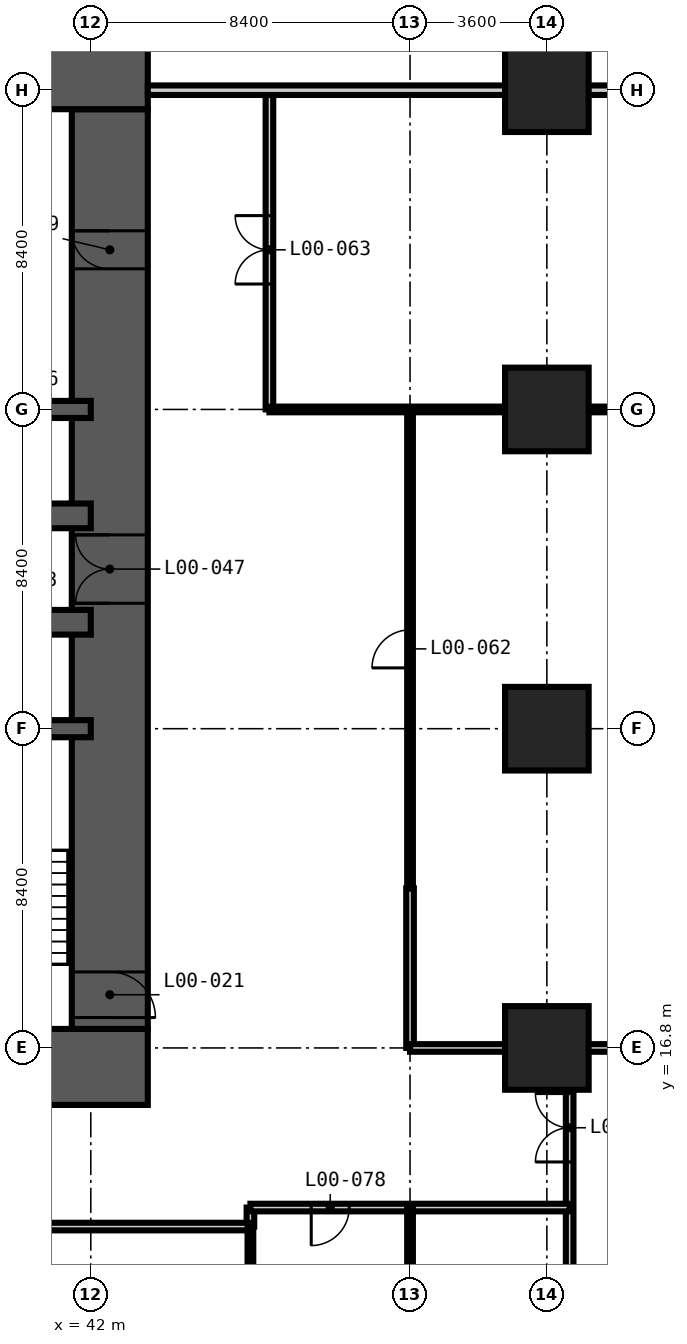
"""IFC4 building model, lengths in metres.
Left out: names, types, materials, properties, quantities, classifications, styles, units other than length and angle.
Written with IfcOpenShell. Run it as: python <this file> out.ifc"""

import sys

from ifc_helpers import new_model, si_unit, direction, frame, frame_2d, origin, origin_2d, place, context, subcontext, project, spatial, rectangle, extrude, element, fill, save


model = new_model("IFC4")
c1 = context("Model", 3, precision=1e-05, world=origin(), true_north=direction((0.0, 1.0)))
c2 = subcontext(c1, "Body", "Model", "MODEL_VIEW")
j1 = project(units=[si_unit("LENGTHUNIT", "METRE"), si_unit("PLANEANGLEUNIT", "RADIAN")], contexts=[c1])
p1 = place(None, origin())
s1 = spatial("IfcSite", under=j1, at=p1, CompositionType="ELEMENT")
p2 = place(p1, origin())
s2 = spatial("IfcBuilding", under=s1, at=p2, CompositionType="ELEMENT")
p3 = place(p2, origin())
s3 = spatial("IfcBuildingStorey", under=s2, at=p3, CompositionType="ELEMENT", Elevation=0.0)
for number, where, z_axis, x_axis in (
    (1, (54.0, 16.8, -0.3), (0.0, 0.0, 1.0), (1.0, 0.0, 0.0)),
    (2, (54.0, 25.2, -0.3), (0.0, 0.0, 1.0), (1.0, 0.0, 0.0)),
    (3, (54.0, 33.6, -0.3), (0.0, 0.0, 1.0), (1.0, 0.0, 0.0)),
    (4, (54.0, 42.0, -0.3), (0.0, 0.0, 1.0), (1.0, 0.0, 0.0)),
):
    element("IfcColumn", number, at=place(p3, frame(where, z_axis=z_axis, x_axis=x_axis)), inside=s3, PredefinedType="COLUMN", context=c2, shape_type="SweptSolid", body=[
        extrude(rectangle(XDim=2.2, YDim=2.2, at=origin_2d()), origin(), (0.0, 0.0, 1.0), 6.0),
    ])
p4 = place(p3, frame((15.3, 16.3, -0.3), z_axis=(0.0, 0.0, 1.0), x_axis=(1.0, 0.0, 0.0)))
e5 = element("IfcWall", 5, at=p4, inside=s3, PredefinedType="SHEAR", context=c2, shape_type="SweptSolid", body=[
    extrude(rectangle(XDim=28.2, YDim=2.0, at=frame_2d((14.1, 0.0))), origin(), (0.0, 0.0, 1.0), 6.0),
])
p5 = place(p4, frame((13.6, 0.0, 0.3)))
e6 = element("IfcOpeningElement", 6, at=p5, cuts=e5, PredefinedType="OPENING", context=c2, shape_type="SweptSolid", body=[
    extrude(rectangle(XDim=1.0, YDim=2.1, at=frame_2d((0.5, 1.05))), frame((0.0, 1.01, 0.0), z_axis=(0.0, -1.0, 0.0), x_axis=(1.0, 0.0, 0.0)), (0.0, 0.0, 1.0), 2.02),
])
p6 = place(p4, frame((19.9, 0.0, 0.3)))
e7 = element("IfcOpeningElement", 7, at=p6, cuts=e5, PredefinedType="OPENING", context=c2, shape_type="SweptSolid", body=[
    extrude(rectangle(XDim=1.0, YDim=2.1, at=frame_2d((0.5, 1.05))), frame((0.0, 1.01, 0.0), z_axis=(0.0, -1.0, 0.0), x_axis=(1.0, 0.0, 0.0)), (0.0, 0.0, 1.0), 2.02),
])
p7 = place(p3, frame((42.5, 17.3, -0.3), z_axis=(0.0, 0.0, 1.0), x_axis=(0.0, 1.0, 0.0)))
e8 = element("IfcWall", 8, at=p7, inside=s3, PredefinedType="SHEAR", context=c2, shape_type="SweptSolid", body=[
    extrude(rectangle(XDim=24.2, YDim=2.0, at=frame_2d((12.1, 0.0))), origin(), (0.0, 0.0, 1.0), 6.0),
])
p8 = place(p7, frame((0.3, 0.0, 0.3)))
e9 = element("IfcOpeningElement", 9, at=p8, cuts=e8, PredefinedType="OPENING", context=c2, shape_type="SweptSolid", body=[
    extrude(rectangle(XDim=1.2, YDim=2.2, at=frame_2d((0.6, 1.1))), frame((0.0, 1.01, 0.0), z_axis=(0.0, -1.0, 0.0), x_axis=(1.0, 0.0, 0.0)), (0.0, 0.0, 1.0), 2.02),
])
p9 = place(p7, frame((11.2, 0.0, 0.3)))
e10 = element("IfcOpeningElement", 10, at=p9, cuts=e8, PredefinedType="OPENING", context=c2, shape_type="SweptSolid", body=[
    extrude(rectangle(XDim=1.8, YDim=2.2, at=frame_2d((0.9, 1.1))), frame((0.0, 1.01, 0.0), z_axis=(0.0, -1.0, 0.0), x_axis=(1.0, 0.0, 0.0)), (0.0, 0.0, 1.0), 2.02),
])
p10 = place(p7, frame((20.0, 0.0, 0.3)))
e11 = element("IfcOpeningElement", 11, at=p10, cuts=e8, PredefinedType="OPENING", context=c2, shape_type="SweptSolid", body=[
    extrude(rectangle(XDim=1.0, YDim=2.1, at=frame_2d((0.5, 1.05))), frame((0.0, 1.01, 0.0), z_axis=(0.0, -1.0, 0.0), x_axis=(1.0, 0.0, 0.0)), (0.0, 0.0, 1.0), 2.02),
])
p11 = place(p3, frame((43.5, 42.5, -0.3), z_axis=(0.0, 0.0, 1.0), x_axis=(-1.0, 0.0, 0.0)))
e12 = element("IfcWall", 12, at=p11, inside=s3, PredefinedType="SHEAR", context=c2, shape_type="SweptSolid", body=[
    extrude(rectangle(XDim=28.2, YDim=2.0, at=frame_2d((14.1, 0.0))), origin(), (0.0, 0.0, 1.0), 6.0),
])
p12 = place(p11, frame((22.0, 0.0, 0.3)))
e13 = element("IfcOpeningElement", 13, at=p12, cuts=e12, PredefinedType="OPENING", context=c2, shape_type="SweptSolid", body=[
    extrude(rectangle(XDim=1.0, YDim=2.1, at=frame_2d((0.5, 1.05))), frame((0.0, 1.01, 0.0), z_axis=(0.0, -1.0, 0.0), x_axis=(1.0, 0.0, 0.0)), (0.0, 0.0, 1.0), 2.02),
])
p13 = place(p11, frame((11.4, 0.0, 0.3)))
e14 = element("IfcOpeningElement", 14, at=p13, cuts=e12, PredefinedType="OPENING", context=c2, shape_type="SweptSolid", body=[
    extrude(rectangle(XDim=1.2, YDim=2.2, at=frame_2d((0.6, 1.1))), frame((0.0, 1.01, 0.0), z_axis=(0.0, -1.0, 0.0), x_axis=(1.0, 0.0, 0.0)), (0.0, 0.0, 1.0), 2.02),
])
p14 = place(p3, frame((16.8, 25.2, -0.3), z_axis=(0.0, 0.0, 1.0), x_axis=(1.0, 0.0, 0.0)))
e15 = element("IfcWall", 15, at=p14, inside=s3, PredefinedType="SHEAR", context=c2, shape_type="SweptSolid", body=[
    extrude(rectangle(XDim=25.2, YDim=0.45, at=frame_2d((12.6, 0.0))), origin(), (0.0, 0.0, 1.0), 6.0),
])
p15 = place(p3, frame((16.8, 33.6, -0.3), z_axis=(0.0, 0.0, 1.0), x_axis=(1.0, 0.0, 0.0)))
e16 = element("IfcWall", 16, at=p15, inside=s3, PredefinedType="SHEAR", context=c2, shape_type="SweptSolid", body=[
    extrude(rectangle(XDim=25.2, YDim=0.45, at=frame_2d((12.6, 0.0))), origin(), (0.0, 0.0, 1.0), 6.0),
])
p16 = place(p15, frame((14.2, 0.0, 0.3)))
e17 = element("IfcOpeningElement", 17, at=p16, cuts=e16, PredefinedType="OPENING", context=c2, shape_type="SweptSolid", body=[
    extrude(rectangle(XDim=1.0, YDim=2.1, at=frame_2d((0.5, 1.05))), frame((0.0, 0.235, 0.0), z_axis=(0.0, -1.0, 0.0), x_axis=(1.0, 0.0, 0.0)), (0.0, 0.0, 1.0), 0.47),
])
p17 = place(p15, frame((22.6, 0.0, 0.3)))
e18 = element("IfcOpeningElement", 18, at=p17, cuts=e16, PredefinedType="OPENING", context=c2, shape_type="SweptSolid", body=[
    extrude(rectangle(XDim=1.0, YDim=2.1, at=frame_2d((0.5, 1.05))), frame((0.0, 0.235, 0.0), z_axis=(0.0, -1.0, 0.0), x_axis=(1.0, 0.0, 0.0)), (0.0, 0.0, 1.0), 0.47),
])
p18 = place(p3, frame((33.6, 28.0, -0.3), z_axis=(0.0, 0.0, 1.0), x_axis=(1.0, 0.0, 0.0)))
e19 = element("IfcWall", 19, at=p18, inside=s3, PredefinedType="SHEAR", context=c2, shape_type="SweptSolid", body=[
    extrude(rectangle(XDim=8.4, YDim=0.65, at=frame_2d((4.2, 0.0))), origin(), (0.0, 0.0, 1.0), 6.0),
])
p19 = place(p18, frame((1.55, 0.0, 0.3)))
e20 = element("IfcOpeningElement", 20, at=p19, cuts=e19, PredefinedType="OPENING", context=c2, shape_type="SweptSolid", body=[
    extrude(rectangle(XDim=1.1, YDim=2.2, at=frame_2d((0.55, 1.1))), frame((0.0, 0.335, 0.0), z_axis=(0.0, -1.0, 0.0), x_axis=(1.0, 0.0, 0.0)), (0.0, 0.0, 1.0), 0.67),
])
p20 = place(p18, frame((5.75, 0.0, 0.3)))
e21 = element("IfcOpeningElement", 21, at=p20, cuts=e19, PredefinedType="OPENING", context=c2, shape_type="SweptSolid", body=[
    extrude(rectangle(XDim=1.1, YDim=2.2, at=frame_2d((0.55, 1.1))), frame((0.0, 0.335, 0.0), z_axis=(0.0, -1.0, 0.0), x_axis=(1.0, 0.0, 0.0)), (0.0, 0.0, 1.0), 0.67),
])
p21 = place(p3, frame((33.6, 30.8, -0.3), z_axis=(0.0, 0.0, 1.0), x_axis=(1.0, 0.0, 0.0)))
e22 = element("IfcWall", 22, at=p21, inside=s3, PredefinedType="SHEAR", context=c2, shape_type="SweptSolid", body=[
    extrude(rectangle(XDim=8.4, YDim=0.65, at=frame_2d((4.2, 0.0))), origin(), (0.0, 0.0, 1.0), 6.0),
])
p22 = place(p3, frame((46.2, 12.1, 0.0), z_axis=(0.0, 0.0, 1.0), x_axis=(0.0, 1.0, 0.0)))
e23 = element("IfcWall", 23, at=p22, inside=s3, PredefinedType="PARTITIONING", context=c2, shape_type="SweptSolid", body=[
    extrude(rectangle(XDim=0.5, YDim=0.2, at=frame_2d((0.25, 0.0))), origin(), (0.0, 0.0, 1.0), 5.7),
])
p23 = place(p3, frame((46.7, 33.6, 0.0), z_axis=(0.0, 0.0, 1.0), x_axis=(0.0, 1.0, 0.0)))
e24 = element("IfcWall", 24, at=p23, inside=s3, PredefinedType="PARTITIONING", context=c2, shape_type="SweptSolid", body=[
    extrude(rectangle(XDim=8.4, YDim=0.2, at=frame_2d((4.2, 0.0))), origin(), (0.0, 0.0, 1.0), 5.7),
])
p24 = place(p23, frame((3.3, 0.0, 0.0)))
e25 = element("IfcOpeningElement", 25, at=p24, cuts=e24, PredefinedType="OPENING", context=c2, shape_type="SweptSolid", body=[
    extrude(rectangle(XDim=1.8, YDim=2.4, at=frame_2d((0.9, 1.2))), frame((0.0, 0.11, 0.0), z_axis=(0.0, -1.0, 0.0), x_axis=(1.0, 0.0, 0.0)), (0.0, 0.0, 1.0), 0.22),
])
p25 = place(p3, frame((50.4, 16.8, 0.0), z_axis=(0.0, 0.0, 1.0), x_axis=(0.0, 1.0, 0.0)))
e26 = element("IfcWall", 26, at=p25, inside=s3, PredefinedType="PARTITIONING", context=c2, shape_type="SweptSolid", body=[
    extrude(rectangle(XDim=4.2, YDim=0.2, at=frame_2d((2.1, 0.0))), origin(), (0.0, 0.0, 1.0), 5.7),
])
p26 = place(p3, frame((54.6, 0.0, 0.0), z_axis=(0.0, 0.0, 1.0), x_axis=(0.0, 1.0, 0.0)))
e27 = element("IfcWall", 27, at=p26, inside=s3, PredefinedType="PARTITIONING", context=c2, shape_type="SweptSolid", body=[
    extrude(rectangle(XDim=16.8, YDim=0.2, at=frame_2d((8.4, 0.0))), origin(), (0.0, 0.0, 1.0), 5.7),
])
p27 = place(p26, frame((13.8, 0.0, 0.0)))
e28 = element("IfcOpeningElement", 28, at=p27, cuts=e27, PredefinedType="OPENING", context=c2, shape_type="SweptSolid", body=[
    extrude(rectangle(XDim=1.8, YDim=2.4, at=frame_2d((0.9, 1.2))), frame((0.0, 0.11, 0.0), z_axis=(0.0, -1.0, 0.0), x_axis=(1.0, 0.0, 0.0)), (0.0, 0.0, 1.0), 0.22),
])
p28 = place(p26, frame((5.4, 0.0, 0.0)))
e29 = element("IfcOpeningElement", 29, at=p28, cuts=e27, PredefinedType="OPENING", context=c2, shape_type="SweptSolid", body=[
    extrude(rectangle(XDim=1.8, YDim=2.4, at=frame_2d((0.9, 1.2))), frame((0.0, 0.11, 0.0), z_axis=(0.0, -1.0, 0.0), x_axis=(1.0, 0.0, 0.0)), (0.0, 0.0, 1.0), 0.22),
])
p29 = place(p3, frame((12.6, 12.1, 0.0), z_axis=(0.0, 0.0, 1.0), x_axis=(1.0, 0.0, 0.0)))
e30 = element("IfcWall", 30, at=p29, inside=s3, PredefinedType="PARTITIONING", context=c2, shape_type="SweptSolid", body=[
    extrude(rectangle(XDim=33.6, YDim=0.2, at=frame_2d((16.8, 0.0))), origin(), (0.0, 0.0, 1.0), 5.7),
])
p30 = place(p3, frame((46.2, 12.6, 0.0), z_axis=(0.0, 0.0, 1.0), x_axis=(1.0, 0.0, 0.0)))
e31 = element("IfcWall", 31, at=p30, inside=s3, PredefinedType="PARTITIONING", context=c2, shape_type="SweptSolid", body=[
    extrude(rectangle(XDim=8.4, YDim=0.2, at=frame_2d((4.2, 0.0))), origin(), (0.0, 0.0, 1.0), 5.7),
])
p31 = place(p30, frame((1.6, 0.0, 0.0)))
e32 = element("IfcOpeningElement", 32, at=p31, cuts=e31, PredefinedType="OPENING", context=c2, shape_type="SweptSolid", body=[
    extrude(rectangle(XDim=1.0, YDim=2.1, at=frame_2d((0.5, 1.05))), frame((0.0, 0.11, 0.0), z_axis=(0.0, -1.0, 0.0), x_axis=(1.0, 0.0, 0.0)), (0.0, 0.0, 1.0), 0.22),
])
p32 = place(p3, frame((50.4, 16.8, 0.0), z_axis=(0.0, 0.0, 1.0), x_axis=(1.0, 0.0, 0.0)))
e33 = element("IfcWall", 33, at=p32, inside=s3, PredefinedType="PARTITIONING", context=c2, shape_type="SweptSolid", body=[
    extrude(rectangle(XDim=8.4, YDim=0.2, at=frame_2d((4.2, 0.0))), origin(), (0.0, 0.0, 1.0), 5.7),
])
p33 = place(p3, frame((43.5, 42.0, 0.0), z_axis=(0.0, 0.0, 1.0), x_axis=(1.0, 0.0, 0.0)))
e34 = element("IfcWall", 34, at=p33, inside=s3, PredefinedType="PARTITIONING", context=c2, shape_type="SweptSolid", body=[
    extrude(rectangle(XDim=15.3, YDim=0.25, at=frame_2d((7.65, 0.0))), origin(), (0.0, 0.0, 1.0), 5.7),
])
p34 = place(p3, frame((46.2, 2.4, 0.0), z_axis=(0.0, 0.0, 1.0), x_axis=(0.0, 1.0, 0.0)))
e35 = element("IfcWall", 35, at=p34, inside=s3, PredefinedType="PARTITIONING", context=c2, shape_type="SweptSolid", body=[
    extrude(rectangle(XDim=9.7, YDim=0.15, at=frame_2d((4.85, 0.0))), origin(), (0.0, 0.0, 1.0), 5.7),
])
p35 = place(p3, frame((50.4, 2.4, 0.0), z_axis=(0.0, 0.0, 1.0), x_axis=(0.0, 1.0, 0.0)))
e36 = element("IfcWall", 36, at=p35, inside=s3, PredefinedType="PARTITIONING", context=c2, shape_type="SweptSolid", body=[
    extrude(rectangle(XDim=10.2, YDim=0.15, at=frame_2d((5.1, 0.0))), origin(), (0.0, 0.0, 1.0), 5.7),
])
p36 = place(p3, frame((50.4, 21.0, 0.0), z_axis=(0.0, 0.0, 1.0), x_axis=(0.0, 1.0, 0.0)))
e37 = element("IfcWall", 37, at=p36, inside=s3, PredefinedType="PARTITIONING", context=c2, shape_type="SweptSolid", body=[
    extrude(rectangle(XDim=12.6, YDim=0.15, at=frame_2d((6.3, 0.0))), origin(), (0.0, 0.0, 1.0), 5.7),
])
p37 = place(p36, frame((5.8, 0.0, 0.0)))
e38 = element("IfcOpeningElement", 38, at=p37, cuts=e37, PredefinedType="OPENING", context=c2, shape_type="SweptSolid", body=[
    extrude(rectangle(XDim=1.0, YDim=2.1, at=frame_2d((0.5, 1.05))), frame((0.0, 0.085, 0.0), z_axis=(0.0, -1.0, 0.0), x_axis=(1.0, 0.0, 0.0)), (0.0, 0.0, 1.0), 0.17),
])
p38 = place(p3, frame((46.7, 33.6, 0.0), z_axis=(0.0, 0.0, 1.0), x_axis=(1.0, 0.0, 0.0)))
e39 = element("IfcWall", 39, at=p38, inside=s3, PredefinedType="PARTITIONING", context=c2, shape_type="SweptSolid", body=[
    extrude(rectangle(XDim=12.1, YDim=0.15, at=frame_2d((6.05, 0.0))), origin(), (0.0, 0.0, 1.0), 5.7),
])
p39 = place(p8, frame((1.2, 0.0, 0.0), z_axis=(0.0, 0.0, 1.0), x_axis=(-1.0, 0.0, 0.0)))
e40 = element("IfcDoor", 40, at=p39, inside=s3, OperationType="SINGLE_SWING_RIGHT", PredefinedType="DOOR", context=c2, shape_type="SweptSolid", body=[
    extrude(rectangle(XDim=1.2, YDim=2.2, at=frame_2d((0.6, 1.1))), frame((0.0, 0.025, 0.0), z_axis=(0.0, -1.0, 0.0), x_axis=(1.0, 0.0, 0.0)), (0.0, 0.0, 1.0), 0.05),
])
fill(e9, e40)
p40 = place(p9, origin())
e41 = element("IfcDoor", 41, at=p40, inside=s3, OperationType="DOUBLE_DOOR_DOUBLE_SWING", PredefinedType="DOOR", context=c2, shape_type="SweptSolid", body=[
    extrude(rectangle(XDim=1.8, YDim=2.2, at=frame_2d((0.9, 1.1))), frame((0.0, 0.025, 0.0), z_axis=(0.0, -1.0, 0.0), x_axis=(1.0, 0.0, 0.0)), (0.0, 0.0, 1.0), 0.05),
])
fill(e10, e41)
p41 = place(p10, origin())
e42 = element("IfcDoor", 42, at=p41, inside=s3, OperationType="SINGLE_SWING_RIGHT", PredefinedType="DOOR", context=c2, shape_type="SweptSolid", body=[
    extrude(rectangle(XDim=1.0, YDim=2.1, at=frame_2d((0.5, 1.05))), frame((0.0, 0.025, 0.0), z_axis=(0.0, -1.0, 0.0), x_axis=(1.0, 0.0, 0.0)), (0.0, 0.0, 1.0), 0.05),
])
fill(e11, e42)
p42 = place(p27, origin())
e43 = element("IfcDoor", 43, at=p42, inside=s3, OperationType="DOUBLE_DOOR_DOUBLE_SWING", PredefinedType="DOOR", context=c2, shape_type="SweptSolid", body=[
    extrude(rectangle(XDim=1.8, YDim=2.4, at=frame_2d((0.9, 1.2))), frame((0.0, 0.025, 0.0), z_axis=(0.0, -1.0, 0.0), x_axis=(1.0, 0.0, 0.0)), (0.0, 0.0, 1.0), 0.05),
])
fill(e28, e43)
p43 = place(p37, origin())
e44 = element("IfcDoor", 44, at=p43, inside=s3, OperationType="SINGLE_SWING_LEFT", PredefinedType="DOOR", context=c2, shape_type="SweptSolid", body=[
    extrude(rectangle(XDim=1.0, YDim=2.1, at=frame_2d((0.5, 1.05))), frame((0.0, 0.025, 0.0), z_axis=(0.0, -1.0, 0.0), x_axis=(1.0, 0.0, 0.0)), (0.0, 0.0, 1.0), 0.05),
])
fill(e38, e44)
p44 = place(p24, origin())
e45 = element("IfcDoor", 45, at=p44, inside=s3, OperationType="DOUBLE_DOOR_DOUBLE_SWING", PredefinedType="DOOR", context=c2, shape_type="SweptSolid", body=[
    extrude(rectangle(XDim=1.8, YDim=2.4, at=frame_2d((0.9, 1.2))), frame((0.0, 0.025, 0.0), z_axis=(0.0, -1.0, 0.0), x_axis=(1.0, 0.0, 0.0)), (0.0, 0.0, 1.0), 0.05),
])
fill(e25, e45)
p45 = place(p31, frame((1.0, 0.0, 0.0), z_axis=(0.0, 0.0, 1.0), x_axis=(-1.0, 0.0, 0.0)))
e46 = element("IfcDoor", 46, at=p45, inside=s3, OperationType="SINGLE_SWING_RIGHT", PredefinedType="DOOR", context=c2, shape_type="SweptSolid", body=[
    extrude(rectangle(XDim=1.0, YDim=2.1, at=frame_2d((0.5, 1.05))), frame((0.0, 0.025, 0.0), z_axis=(0.0, -1.0, 0.0), x_axis=(1.0, 0.0, 0.0)), (0.0, 0.0, 1.0), 0.05),
])
fill(e32, e46)
save(model, sys.argv[1])
